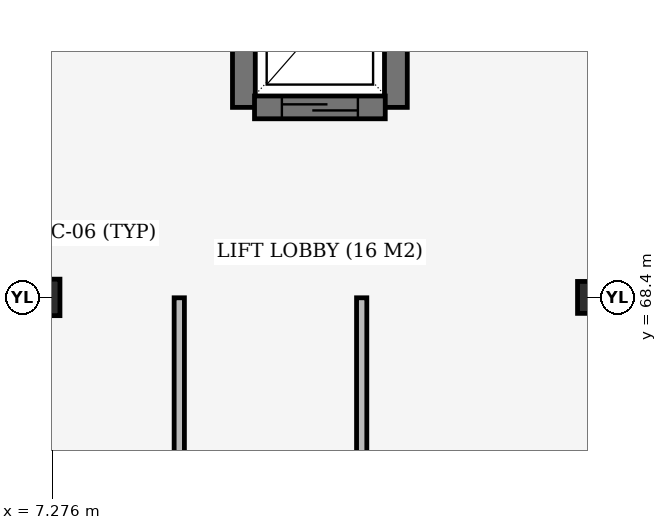
"""IFC4 building model, lengths in metres.
Left out: names, types, materials, properties, quantities, classifications, styles, units other than length and angle.
Written with IfcOpenShell. Run it as: python <this file> out.ifc"""

import sys

from ifc_helpers import new_model, si_unit, direction, frame, frame_2d, origin, origin_2d, place, context, subcontext, project, spatial, rectangle, extrude, element, fill, save


model = new_model("IFC4")
c1 = context("Model", 3, precision=1e-05, world=origin(), true_north=direction((0.0, 1.0)))
c2 = subcontext(c1, "Body", "Model", "MODEL_VIEW")
j1 = project(units=[si_unit("LENGTHUNIT", "METRE"), si_unit("PLANEANGLEUNIT", "RADIAN")], contexts=[c1])
p1 = place(None, origin())
s1 = spatial("IfcSite", under=j1, at=p1, CompositionType="ELEMENT")
p2 = place(p1, origin())
s2 = spatial("IfcBuilding", under=s1, at=p2, CompositionType="ELEMENT")
p3 = place(p2, frame((0.0, 0.0, 9.6)))
s3 = spatial("IfcBuildingStorey", under=s2, at=p3, CompositionType="ELEMENT", Elevation=9.6)
p4 = place(p3, frame((7.2, 68.4, 0.0), z_axis=(0.0, 0.0, 1.0), x_axis=(1.0, 0.0, 0.0)))
e1 = element("IfcColumn", 1, at=p4, inside=s3, PredefinedType="COLUMN", context=c2, shape_type="SweptSolid", body=[
    extrude(rectangle(XDim=0.36, YDim=0.48, at=origin_2d()), origin(), (0.0, 0.0, 1.0), 3.89),
])
p5 = place(p3, frame((14.4, 68.4, 0.0), z_axis=(0.0, 0.0, 1.0), x_axis=(1.0, 0.0, 0.0)))
e2 = element("IfcColumn", 2, at=p5, inside=s3, PredefinedType="COLUMN", context=c2, shape_type="SweptSolid", body=[
    extrude(rectangle(XDim=0.42, YDim=0.42, at=origin_2d()), origin(), (0.0, 0.0, 1.0), 3.89),
])
for number, where, z_axis, x_axis in (
    (3, (9.8, 73.1, 0.0), (0.0, 0.0, 1.0), (0.0, -1.0, 0.0)),
    (4, (11.8, 70.9, 0.0), (0.0, 0.0, 1.0), (0.0, 1.0, 0.0)),
):
    element("IfcWall", number, at=place(p3, frame(where, z_axis=z_axis, x_axis=x_axis)), inside=s3, PredefinedType="SHEAR", context=c2, shape_type="SweptSolid", body=[
        extrude(rectangle(XDim=2.2, YDim=0.3, at=frame_2d((1.1, 0.0))), origin(), (0.0, 0.0, 1.0), 3.89),
    ])
p6 = place(p3, frame((11.66, 70.9, 0.0), z_axis=(0.0, 0.0, 1.0), x_axis=(-1.0, 0.0, 0.0)))
e5 = element("IfcWall", 5, at=p6, inside=s3, PredefinedType="SHEAR", context=c2, shape_type="SweptSolid", body=[
    extrude(rectangle(XDim=1.72, YDim=0.3, at=frame_2d((0.86, 0.0))), origin(), (0.0, 0.0, 1.0), 3.89),
])
p7 = place(p6, frame((0.36, 0.0, 0.0)))
e6 = element("IfcOpeningElement", 6, at=p7, cuts=e5, PredefinedType="OPENING", context=c2, shape_type="SweptSolid", body=[
    extrude(rectangle(XDim=1.0, YDim=2.1, at=frame_2d((0.5, 1.05))), frame((0.0, 0.16, 0.0), z_axis=(0.0, -1.0, 0.0), x_axis=(1.0, 0.0, 0.0)), (0.0, 0.0, 1.0), 0.32),
])
p8 = place(p3, frame((8.95, 51.558, 0.0), z_axis=(0.0, 0.0, 1.0), x_axis=(0.0, 1.0, 0.0)))
e7 = element("IfcWall", 7, at=p8, inside=s3, PredefinedType="PARTITIONING", context=c2, shape_type="SweptSolid", body=[
    extrude(rectangle(XDim=16.837, YDim=0.135, at=frame_2d((8.418, 0.0))), origin(), (0.0, 0.0, 1.0), 3.15),
])
p9 = place(p8, frame((7.838, 0.0, 0.0)))
e8 = element("IfcOpeningElement", 8, at=p9, cuts=e7, PredefinedType="OPENING", context=c2, shape_type="SweptSolid", body=[
    extrude(rectangle(XDim=1.16, YDim=2.2, at=frame_2d((0.58, 1.1))), frame((0.0, 0.077, 0.0), z_axis=(0.0, -1.0, 0.0), x_axis=(1.0, 0.0, 0.0)), (0.0, 0.0, 1.0), 0.155),
])
p10 = place(p3, frame((11.35, 51.558, 0.0), z_axis=(0.0, 0.0, 1.0), x_axis=(0.0, 1.0, 0.0)))
e9 = element("IfcWall", 9, at=p10, inside=s3, PredefinedType="PARTITIONING", context=c2, shape_type="SweptSolid", body=[
    extrude(rectangle(XDim=16.837, YDim=0.135, at=frame_2d((8.418, 0.0))), origin(), (0.0, 0.0, 1.0), 3.15),
])
p11 = place(p10, frame((7.838, 0.0, 0.0)))
e10 = element("IfcOpeningElement", 10, at=p11, cuts=e9, PredefinedType="OPENING", context=c2, shape_type="SweptSolid", body=[
    extrude(rectangle(XDim=1.16, YDim=2.2, at=frame_2d((0.58, 1.1))), frame((0.0, 0.077, 0.0), z_axis=(0.0, -1.0, 0.0), x_axis=(1.0, 0.0, 0.0)), (0.0, 0.0, 1.0), 0.155),
])
p12 = place(p7, origin())
e11 = element("IfcDoor", 11, at=p12, inside=s3, OperationType="SLIDING_TO_LEFT", PredefinedType="DOOR", context=c2, shape_type="SweptSolid", body=[
    extrude(rectangle(XDim=1.0, YDim=2.1, at=frame_2d((0.5, 1.05))), frame((0.0, 0.025, 0.0), z_axis=(0.0, -1.0, 0.0), x_axis=(1.0, 0.0, 0.0)), (0.0, 0.0, 1.0), 0.05),
])
fill(e6, e11)
save(model, sys.argv[1])
